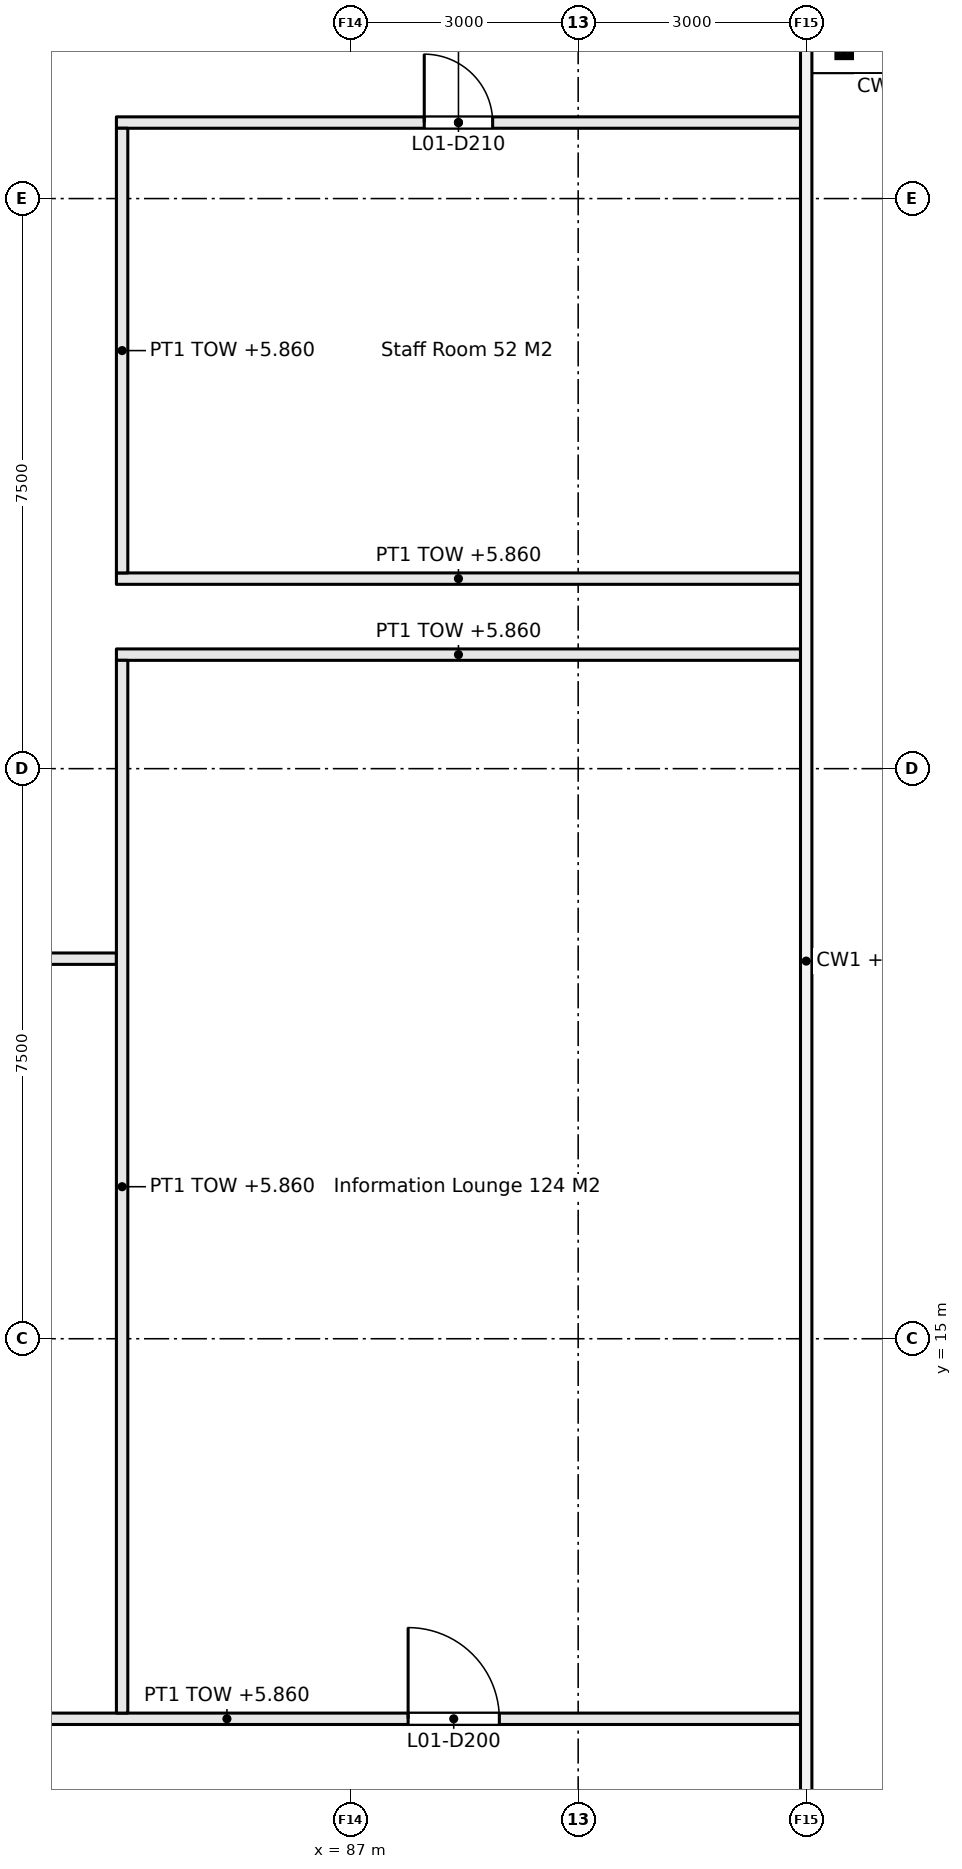
"""IFC4 building model, lengths in metres.
Left out: names, types, materials, properties, quantities, classifications, styles, units other than length and angle.
Written with IfcOpenShell. Run it as: python <this file> out.ifc"""

import sys

from ifc_helpers import new_model, si_unit, direction, frame, frame_2d, origin, origin_2d, place, context, subcontext, project, spatial, rectangle, hollow_rectangle, extrude, element, fill, save


model = new_model("IFC4")
c1 = context("Model", 3, precision=1e-05, world=origin(), true_north=direction((0.0, 1.0)))
c2 = subcontext(c1, "Body", "Model", "MODEL_VIEW")
j1 = project(units=[si_unit("LENGTHUNIT", "METRE"), si_unit("PLANEANGLEUNIT", "RADIAN")], contexts=[c1])
p1 = place(None, origin())
s1 = spatial("IfcSite", under=j1, at=p1, CompositionType="ELEMENT")
p2 = place(p1, origin())
s2 = spatial("IfcBuilding", under=s1, at=p2, CompositionType="ELEMENT")
p3 = place(p2, frame((0.0, 0.0, 3.3)))
s3 = spatial("IfcBuildingStorey", under=s2, at=p3, CompositionType="ELEMENT", Elevation=3.3)
p4 = place(p3, frame((93.5, 31.95, 0.0), z_axis=(0.0, 0.0, 1.0), x_axis=(1.0, 0.0, 0.0)))
e1 = element("IfcColumn", 1, at=p4, inside=s3, PredefinedType="COLUMN", context=c2, shape_type="SweptSolid", body=[
    extrude(hollow_rectangle(XDim=0.178, YDim=0.178, WallThickness=0.01, at=origin_2d()), origin(), (0.0, 0.0, 1.0), 2.9),
])
p5 = place(p3, frame((71.925, 10.0, 0.0), z_axis=(0.0, 0.0, 1.0), x_axis=(1.0, 0.0, 0.0)))
e2 = element("IfcWall", 2, at=p5, inside=s3, PredefinedType="PARTITIONING", context=c2, shape_type="SweptSolid", body=[
    extrude(rectangle(XDim=21.0, YDim=0.15, at=frame_2d((10.5, 0.0))), origin(), (0.0, 0.0, 1.0), 2.56),
])
p6 = place(p5, frame((15.838, 0.0, 0.0)))
e3 = element("IfcOpeningElement", 3, at=p6, cuts=e2, PredefinedType="OPENING", context=c2, shape_type="SweptSolid", body=[
    extrude(rectangle(XDim=1.2, YDim=2.1, at=frame_2d((0.6, 1.05))), frame((0.0, 0.085, 0.0), z_axis=(0.0, -1.0, 0.0), x_axis=(1.0, 0.0, 0.0)), (0.0, 0.0, 1.0), 0.17),
])
p7 = place(p3, frame((71.925, 20.0, 0.0), z_axis=(0.0, 0.0, 1.0), x_axis=(1.0, 0.0, 0.0)))
e4 = element("IfcWall", 4, at=p7, inside=s3, PredefinedType="PARTITIONING", context=c2, shape_type="SweptSolid", body=[
    extrude(rectangle(XDim=12.0, YDim=0.15, at=frame_2d((6.0, 0.0))), origin(), (0.0, 0.0, 1.0), 2.61),
])
for number, where, z_axis, x_axis in (
    (5, (83.925, 24.0, 0.0), (0.0, 0.0, 1.0), (1.0, 0.0, 0.0)),
    (6, (83.925, 25.0, 0.0), (0.0, 0.0, 1.0), (1.0, 0.0, 0.0)),
):
    element("IfcWall", number, at=place(p3, frame(where, z_axis=z_axis, x_axis=x_axis)), inside=s3, PredefinedType="PARTITIONING", context=c2, shape_type="SweptSolid", body=[
        extrude(rectangle(XDim=9.0, YDim=0.15, at=frame_2d((4.5, 0.0))), origin(), (0.0, 0.0, 1.0), 2.56),
    ])
p8 = place(p3, frame((83.925, 31.0, 0.0), z_axis=(0.0, 0.0, 1.0), x_axis=(1.0, 0.0, 0.0)))
e7 = element("IfcWall", 7, at=p8, inside=s3, PredefinedType="PARTITIONING", context=c2, shape_type="SweptSolid", body=[
    extrude(rectangle(XDim=9.0, YDim=0.15, at=frame_2d((4.5, 0.0))), origin(), (0.0, 0.0, 1.0), 2.56),
])
p9 = place(p8, frame((4.05, 0.0, 0.0)))
e8 = element("IfcOpeningElement", 8, at=p9, cuts=e7, PredefinedType="OPENING", context=c2, shape_type="SweptSolid", body=[
    extrude(rectangle(XDim=0.9, YDim=2.1, at=frame_2d((0.45, 1.05))), frame((0.0, 0.085, 0.0), z_axis=(0.0, -1.0, 0.0), x_axis=(1.0, 0.0, 0.0)), (0.0, 0.0, 1.0), 0.17),
])
p10 = place(p3, frame((84.0, 10.075, 0.0), z_axis=(0.0, 0.0, 1.0), x_axis=(0.0, 1.0, 0.0)))
e9 = element("IfcWall", 9, at=p10, inside=s3, PredefinedType="PARTITIONING", context=c2, shape_type="SweptSolid", body=[
    extrude(rectangle(XDim=13.85, YDim=0.15, at=frame_2d((6.925, 0.0))), origin(), (0.0, 0.0, 1.0), 2.56),
])
p11 = place(p3, frame((84.0, 25.075, 0.0), z_axis=(0.0, 0.0, 1.0), x_axis=(0.0, 1.0, 0.0)))
e10 = element("IfcWall", 10, at=p11, inside=s3, PredefinedType="PARTITIONING", context=c2, shape_type="SweptSolid", body=[
    extrude(rectangle(XDim=5.85, YDim=0.15, at=frame_2d((2.925, 0.0))), origin(), (0.0, 0.0, 1.0), 2.56),
])
p12 = place(p6, origin())
e11 = element("IfcDoor", 11, at=p12, inside=s3, OperationType="DOUBLE_DOOR_SINGLE_SWING", PredefinedType="DOOR", context=c2, shape_type="SweptSolid", body=[
    extrude(rectangle(XDim=1.2, YDim=2.1, at=frame_2d((0.6, 1.05))), frame((0.0, 0.025, 0.0), z_axis=(0.0, -1.0, 0.0), x_axis=(1.0, 0.0, 0.0)), (0.0, 0.0, 1.0), 0.05),
])
fill(e3, e11)
p13 = place(p9, origin())
e12 = element("IfcDoor", 12, at=p13, inside=s3, OperationType="SINGLE_SWING_LEFT", PredefinedType="DOOR", context=c2, shape_type="SweptSolid", body=[
    extrude(rectangle(XDim=0.9, YDim=2.1, at=frame_2d((0.45, 1.05))), frame((0.0, 0.025, 0.0), z_axis=(0.0, -1.0, 0.0), x_axis=(1.0, 0.0, 0.0)), (0.0, 0.0, 1.0), 0.05),
])
fill(e8, e12)
save(model, sys.argv[1])
